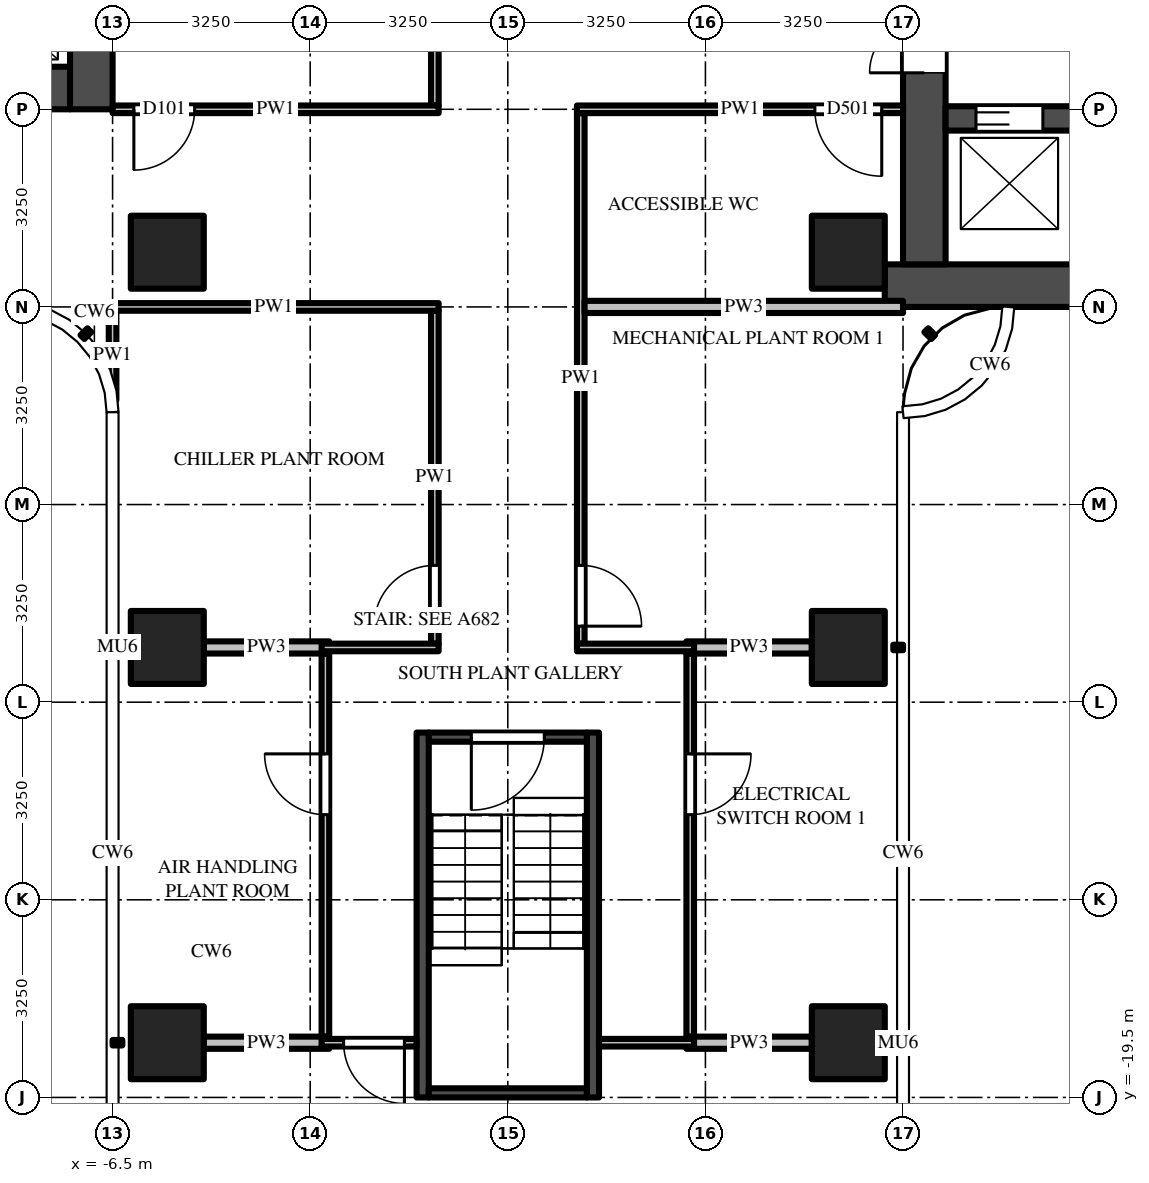
"""IFC4 building model, lengths in metres.
Left out: names, types, materials, properties, quantities, classifications, styles, units other than length and angle.
Written with IfcOpenShell. Run it as: python <this file> out.ifc"""

import sys

from ifc_helpers import new_model, si_unit, direction, frame, frame_2d, origin, origin_2d, place, context, subcontext, project, spatial, rectangle, extrude, source, transform, mapped, element, fill, save


model = new_model("IFC4")
c1 = context("Model", 3, precision=1e-05, world=origin(), true_north=direction((0.0, 1.0)))
c2 = subcontext(c1, "Body", "Model", "MODEL_VIEW")
j1 = project(units=[si_unit("LENGTHUNIT", "METRE"), si_unit("PLANEANGLEUNIT", "RADIAN")], contexts=[c1])
p1 = place(None, origin())
s1 = spatial("IfcSite", under=j1, at=p1, CompositionType="ELEMENT")
p2 = place(p1, origin())
s2 = spatial("IfcBuilding", under=s1, at=p2, CompositionType="ELEMENT")
p3 = place(p2, frame((0.0, 0.0, 156.0)))
s3 = spatial("IfcBuildingStorey", under=s2, at=p3, CompositionType="ELEMENT", Elevation=156.0)
m1 = source(origin(), c2, "Body", "SweptSolid", [
    extrude(rectangle(XDim=1.2, YDim=1.2, at=origin_2d()), origin(), (0.0, 0.0, 1.0), 6.0),
])
for number, where, z_axis, x_axis in (
    (1, (5.6, -5.6, 0.0), (0.0, 0.0, 1.0), (1.0, 0.0, 0.0)),
    (2, (-5.6, -5.6, 0.0), (0.0, 0.0, 1.0), (1.0, 0.0, 0.0)),
    (3, (5.6, -12.1, 0.0), (0.0, 0.0, 1.0), (1.0, 0.0, 0.0)),
    (4, (5.6, -18.6, 0.0), (0.0, 0.0, 1.0), (1.0, 0.0, 0.0)),
    (5, (-5.6, -12.1, 0.0), (0.0, 0.0, 1.0), (1.0, 0.0, 0.0)),
    (6, (-5.6, -18.6, 0.0), (0.0, 0.0, 1.0), (1.0, 0.0, 0.0)),
):
    element("IfcColumn", number, at=place(p3, frame(where, z_axis=z_axis, x_axis=x_axis)), inside=s3, PredefinedType="COLUMN", context=c2, shape_type="MappedRepresentation", body=[
        mapped(m1, transform((0.0, 0.0, 0.0))),
    ])
m2 = source(origin(), c2, "Body", "SweptSolid", [
    extrude(rectangle(XDim=16.55, YDim=0.7, at=frame_2d((8.275, 0.0))), origin(), (0.0, 0.0, 1.0), 5.8),
])
p4 = place(p3, frame((6.2, -6.15, 0.0), z_axis=(0.0, 0.0, 1.0), x_axis=(1.0, 0.0, 0.0)))
e7 = element("IfcWall", 7, at=p4, inside=s3, PredefinedType="SHEAR", context=c2, shape_type="MappedRepresentation", body=[
    mapped(m2, transform((0.0, 0.0, 0.0))),
])
m3 = source(origin(), c2, "Body", "SweptSolid", [
    extrude(rectangle(XDim=9.05, YDim=0.7, at=frame_2d((4.525, 0.0))), origin(), (0.0, 0.0, 1.0), 5.8),
])
p5 = place(p3, frame((6.85, -5.8, 0.0), z_axis=(0.0, 0.0, 1.0), x_axis=(0.0, 1.0, 0.0)))
e8 = element("IfcWall", 8, at=p5, inside=s3, PredefinedType="SHEAR", context=c2, shape_type="MappedRepresentation", body=[
    mapped(m3, transform((0.0, 0.0, 0.0))),
])
m4 = source(origin(), c2, "Body", "SweptSolid", [
    extrude(rectangle(XDim=1.8, YDim=2.1, at=frame_2d((0.9, 1.05))), frame((0.0, 0.36, 0.0), z_axis=(0.0, -1.0, 0.0), x_axis=(1.0, 0.0, 0.0)), (0.0, 0.0, 1.0), 0.72),
])
p6 = place(p5, frame((3.15, 0.0, 0.0)))
e9 = element("IfcOpeningElement", 9, at=p6, cuts=e8, PredefinedType="OPENING", context=c2, shape_type="MappedRepresentation", body=[
    mapped(m4, transform((0.0, 0.0, 0.0))),
])
m5 = source(origin(), c2, "Body", "SweptSolid", [
    extrude(rectangle(XDim=7.5, YDim=0.4, at=frame_2d((3.75, 0.0))), origin(), (0.0, 0.0, 1.0), 5.8),
])
p7 = place(p3, frame((7.2, -3.4, 0.0), z_axis=(0.0, 0.0, 1.0), x_axis=(1.0, 0.0, 0.0)))
e10 = element("IfcWall", 10, at=p7, inside=s3, PredefinedType="SHEAR", context=c2, shape_type="MappedRepresentation", body=[
    mapped(m5, transform((0.0, 0.0, 0.0))),
])
m6 = source(origin(), c2, "Body", "SweptSolid", [
    extrude(rectangle(XDim=1.1, YDim=2.1, at=frame_2d((0.55, 1.05))), frame((0.0, 0.21, 0.0), z_axis=(0.0, -1.0, 0.0), x_axis=(1.0, 0.0, 0.0)), (0.0, 0.0, 1.0), 0.42),
])
p8 = place(p7, frame((0.5, 0.0, 0.0)))
e11 = element("IfcOpeningElement", 11, at=p8, cuts=e10, PredefinedType="OPENING", context=c2, shape_type="MappedRepresentation", body=[
    mapped(m6, transform((0.0, 0.0, 0.0))),
])
p9 = place(p7, frame((3.0, 0.0, 0.0)))
e12 = element("IfcOpeningElement", 12, at=p9, cuts=e10, PredefinedType="OPENING", context=c2, shape_type="MappedRepresentation", body=[
    mapped(m6, transform((0.0, 0.0, 0.0))),
])
p10 = place(p7, frame((5.5, 0.0, 0.0)))
e13 = element("IfcOpeningElement", 13, at=p10, cuts=e10, PredefinedType="OPENING", context=c2, shape_type="MappedRepresentation", body=[
    mapped(m6, transform((0.0, 0.0, 0.0))),
])
m7 = source(origin(), c2, "Body", "SweptSolid", [
    extrude(rectangle(XDim=14.85, YDim=0.7, at=frame_2d((7.425, 0.0))), origin(), (0.0, 0.0, 1.0), 5.8),
])
p11 = place(p3, frame((-7.2, -2.9, 0.0), z_axis=(0.0, 0.0, 1.0), x_axis=(-1.0, 0.0, 0.0)))
e14 = element("IfcWall", 14, at=p11, inside=s3, PredefinedType="SHEAR", context=c2, shape_type="MappedRepresentation", body=[
    mapped(m7, transform((0.0, 0.0, 0.0))),
])
m8 = source(origin(), c2, "Body", "SweptSolid", [
    extrude(rectangle(XDim=1.1, YDim=2.1, at=frame_2d((0.55, 1.05))), frame((0.0, 0.36, 0.0), z_axis=(0.0, -1.0, 0.0), x_axis=(1.0, 0.0, 0.0)), (0.0, 0.0, 1.0), 0.72),
])
p12 = place(p11, frame((0.55, 0.0, 0.0)))
e15 = element("IfcOpeningElement", 15, at=p12, cuts=e14, PredefinedType="OPENING", context=c2, shape_type="MappedRepresentation", body=[
    mapped(m8, transform((0.0, 0.0, 0.0))),
])
p13 = place(p11, frame((3.15, 0.0, 0.0)))
e16 = element("IfcOpeningElement", 16, at=p13, cuts=e14, PredefinedType="OPENING", context=c2, shape_type="MappedRepresentation", body=[
    mapped(m8, transform((0.0, 0.0, 0.0))),
])
m9 = source(origin(), c2, "Body", "SweptSolid", [
    extrude(rectangle(XDim=1.2, YDim=2.1, at=frame_2d((0.6, 1.05))), frame((0.0, 0.36, 0.0), z_axis=(0.0, -1.0, 0.0), x_axis=(1.0, 0.0, 0.0)), (0.0, 0.0, 1.0), 0.72),
])
p14 = place(p11, frame((5.7, 0.0, 0.0)))
e17 = element("IfcOpeningElement", 17, at=p14, cuts=e14, PredefinedType="OPENING", context=c2, shape_type="MappedRepresentation", body=[
    mapped(m9, transform((0.0, 0.0, 0.0))),
])
m10 = source(origin(), c2, "Body", "SweptSolid", [
    extrude(rectangle(XDim=1.3, YDim=2.1, at=frame_2d((0.65, 1.05))), frame((0.0, 0.36, 0.0), z_axis=(0.0, -1.0, 0.0), x_axis=(1.0, 0.0, 0.0)), (0.0, 0.0, 1.0), 0.72),
])
p15 = place(p11, frame((12.2, 0.0, 0.0)))
e18 = element("IfcOpeningElement", 18, at=p15, cuts=e14, PredefinedType="OPENING", context=c2, shape_type="MappedRepresentation", body=[
    mapped(m10, transform((0.0, 0.0, 0.0))),
])
p16 = place(p11, frame((9.85, 0.0, 0.0)))
e19 = element("IfcOpeningElement", 19, at=p16, cuts=e14, PredefinedType="OPENING", context=c2, shape_type="MappedRepresentation", body=[
    mapped(m9, transform((0.0, 0.0, 0.0))),
])
m11 = source(origin(), c2, "Body", "SweptSolid", [
    extrude(rectangle(XDim=1.0, YDim=2.1, at=frame_2d((0.5, 1.05))), frame((0.0, 0.36, 0.0), z_axis=(0.0, -1.0, 0.0), x_axis=(1.0, 0.0, 0.0)), (0.0, 0.0, 1.0), 0.72),
])
p17 = place(p11, frame((7.9, 0.0, 0.0)))
e20 = element("IfcOpeningElement", 20, at=p17, cuts=e14, PredefinedType="OPENING", context=c2, shape_type="MappedRepresentation", body=[
    mapped(m11, transform((0.0, 0.0, 0.0))),
])
p18 = place(p3, frame((-6.85, 5.8, 0.0), z_axis=(0.0, 0.0, 1.0), x_axis=(0.0, -1.0, 0.0)))
e21 = element("IfcWall", 21, at=p18, inside=s3, PredefinedType="SHEAR", context=c2, shape_type="MappedRepresentation", body=[
    mapped(m3, transform((0.0, 0.0, 0.0))),
])
p19 = place(p18, frame((3.15, 0.0, 0.0)))
e22 = element("IfcOpeningElement", 22, at=p19, cuts=e21, PredefinedType="OPENING", context=c2, shape_type="MappedRepresentation", body=[
    mapped(m4, transform((0.0, 0.0, 0.0))),
])
m12 = source(origin(), c2, "Body", "SweptSolid", [
    extrude(rectangle(XDim=6.0, YDim=0.2, at=frame_2d((3.0, 0.0))), origin(), (0.0, 0.0, 1.0), 5.8),
])
for number, where, z_axis, x_axis in (
    (23, (1.4, -13.5, 0.0), (0.0, 0.0, 1.0), (0.0, -1.0, 0.0)),
    (24, (-1.4, -13.5, 0.0), (0.0, 0.0, 1.0), (0.0, -1.0, 0.0)),
):
    element("IfcWall", number, at=place(p3, frame(where, z_axis=z_axis, x_axis=x_axis)), inside=s3, PredefinedType="SHEAR", context=c2, shape_type="MappedRepresentation", body=[
        mapped(m12, transform((0.0, 0.0, 0.0))),
    ])
m13 = source(origin(), c2, "Body", "SweptSolid", [
    extrude(rectangle(XDim=2.6, YDim=0.15, at=frame_2d((1.3, 0.0))), origin(), (0.0, 0.0, 1.0), 5.8),
])
p20 = place(p3, frame((1.3, -13.575, 0.0), z_axis=(0.0, 0.0, 1.0), x_axis=(-1.0, 0.0, 0.0)))
e25 = element("IfcWall", 25, at=p20, inside=s3, PredefinedType="SHEAR", context=c2, shape_type="MappedRepresentation", body=[
    mapped(m13, transform((0.0, 0.0, 0.0))),
])
m14 = source(origin(), c2, "Body", "SweptSolid", [
    extrude(rectangle(XDim=1.2, YDim=2.1, at=frame_2d((0.6, 1.05))), frame((0.0, 0.085, 0.0), z_axis=(0.0, -1.0, 0.0), x_axis=(1.0, 0.0, 0.0)), (0.0, 0.0, 1.0), 0.17),
])
p21 = place(p20, frame((0.7, 0.0, 0.0)))
e26 = element("IfcOpeningElement", 26, at=p21, cuts=e25, PredefinedType="OPENING", context=c2, shape_type="MappedRepresentation", body=[
    mapped(m14, transform((0.0, 0.0, 0.0))),
])
p22 = place(p3, frame((1.3, -19.425, 0.0), z_axis=(0.0, 0.0, 1.0), x_axis=(-1.0, 0.0, 0.0)))
e27 = element("IfcWall", 27, at=p22, inside=s3, PredefinedType="SHEAR", context=c2, shape_type="MappedRepresentation", body=[
    mapped(m13, transform((0.0, 0.0, 0.0))),
])
m15 = source(origin(), c2, "Body", "SweptSolid", [
    extrude(rectangle(XDim=1.469, YDim=0.125, at=frame_2d((0.734, 0.0))), origin(), (0.0, 0.0, 1.0), 5.8),
])
p23 = place(p3, frame((-6.5, -6.562, 0.0), z_axis=(0.0, 0.0, 1.0), x_axis=(0.0, -1.0, 0.0)))
e28 = element("IfcWall", 28, at=p23, inside=s3, PredefinedType="PARTITIONING", context=c2, shape_type="MappedRepresentation", body=[
    mapped(m15, transform((0.0, 0.0, 0.0))),
])
m16 = source(origin(), c2, "Body", "SweptSolid", [
    extrude(rectangle(XDim=6.3, YDim=0.125, at=frame_2d((3.15, 0.0))), origin(), (0.0, 0.0, 1.0), 5.097),
])
p24 = place(p3, frame((-3.0, -18.5, 0.0), z_axis=(0.0, 0.0, 1.0), x_axis=(0.0, 1.0, 0.0)))
e29 = element("IfcWall", 29, at=p24, inside=s3, PredefinedType="PARTITIONING", context=c2, shape_type="MappedRepresentation", body=[
    mapped(m16, transform((0.0, 0.0, 0.0))),
])
m17 = source(origin(), c2, "Body", "SweptSolid", [
    extrude(rectangle(XDim=1.0, YDim=2.1, at=frame_2d((0.5, 1.05))), frame((0.0, 0.073, 0.0), z_axis=(0.0, -1.0, 0.0), x_axis=(1.0, 0.0, 0.0)), (0.0, 0.0, 1.0), 0.145),
])
p25 = place(p24, frame((3.65, 0.0, 0.0)))
e30 = element("IfcOpeningElement", 30, at=p25, cuts=e29, PredefinedType="OPENING", context=c2, shape_type="MappedRepresentation", body=[
    mapped(m17, transform((0.0, 0.0, 0.0))),
])
m18 = source(origin(), c2, "Body", "SweptSolid", [
    extrude(rectangle(XDim=3.125, YDim=0.125, at=frame_2d((1.562, 0.0))), origin(), (0.0, 0.0, 1.0), 5.168),
])
p26 = place(p3, frame((-1.2, -0.062, 0.0), z_axis=(0.0, 0.0, 1.0), x_axis=(0.0, -1.0, 0.0)))
e31 = element("IfcWall", 31, at=p26, inside=s3, PredefinedType="PARTITIONING", context=c2, shape_type="MappedRepresentation", body=[
    mapped(m18, transform((0.0, 0.0, 0.0))),
])
p27 = place(p3, frame((-1.2, -12.038, 0.0), z_axis=(0.0, 0.0, 1.0), x_axis=(0.0, 1.0, 0.0)))
e32 = element("IfcWall", 32, at=p27, inside=s3, PredefinedType="PARTITIONING", context=c2, shape_type="SweptSolid", body=[
    extrude(rectangle(XDim=5.475, YDim=0.125, at=frame_2d((2.738, 0.0))), origin(), (0.0, 0.0, 1.0), 5.097),
])
p28 = place(p27, frame((0.288, 0.0, 0.0)))
e33 = element("IfcOpeningElement", 33, at=p28, cuts=e32, PredefinedType="OPENING", context=c2, shape_type="MappedRepresentation", body=[
    mapped(m17, transform((0.0, 0.0, 0.0))),
])
p29 = place(p3, frame((1.2, -3.312, 0.0), z_axis=(0.0, 0.0, 1.0), x_axis=(0.0, -1.0, 0.0)))
e34 = element("IfcWall", 34, at=p29, inside=s3, PredefinedType="PARTITIONING", context=c2, shape_type="SweptSolid", body=[
    extrude(rectangle(XDim=8.725, YDim=0.125, at=frame_2d((4.363, 0.0))), origin(), (0.0, 0.0, 1.0), 5.097),
])
p30 = place(p29, frame((7.438, 0.0, 0.0)))
e35 = element("IfcOpeningElement", 35, at=p30, cuts=e34, PredefinedType="OPENING", context=c2, shape_type="MappedRepresentation", body=[
    mapped(m17, transform((0.0, 0.0, 0.0))),
])
p31 = place(p3, frame((3.0, -12.2, 0.0), z_axis=(0.0, 0.0, 1.0), x_axis=(0.0, -1.0, 0.0)))
e36 = element("IfcWall", 36, at=p31, inside=s3, PredefinedType="PARTITIONING", context=c2, shape_type="MappedRepresentation", body=[
    mapped(m16, transform((0.0, 0.0, 0.0))),
])
p32 = place(p31, frame((1.65, 0.0, 0.0)))
e37 = element("IfcOpeningElement", 37, at=p32, cuts=e36, PredefinedType="OPENING", context=c2, shape_type="MappedRepresentation", body=[
    mapped(m17, transform((0.0, 0.0, 0.0))),
])
m19 = source(origin(), c2, "Body", "SweptSolid", [
    extrude(rectangle(XDim=2.062, YDim=0.2, at=frame_2d((1.031, 0.0))), origin(), (0.0, 0.0, 1.0), 5.323),
])
for number, where, z_axis, x_axis in (
    (38, (-5.0, -18.6, 0.0), (0.0, 0.0, 1.0), (1.0, 0.0, 0.0)),
    (39, (2.938, -18.6, 0.0), (0.0, 0.0, 1.0), (1.0, 0.0, 0.0)),
):
    element("IfcWall", number, at=place(p3, frame(where, z_axis=z_axis, x_axis=x_axis)), inside=s3, PredefinedType="PARTITIONING", context=c2, shape_type="MappedRepresentation", body=[
        mapped(m19, transform((0.0, 0.0, 0.0))),
    ])
m20 = source(origin(), c2, "Body", "SweptSolid", [
    extrude(rectangle(XDim=1.562, YDim=0.125, at=frame_2d((0.781, 0.0))), origin(), (0.0, 0.0, 1.0), 5.323),
])
p33 = place(p3, frame((-1.5, -18.6, 0.0), z_axis=(0.0, 0.0, 1.0), x_axis=(-1.0, 0.0, 0.0)))
e40 = element("IfcWall", 40, at=p33, inside=s3, PredefinedType="PARTITIONING", context=c2, shape_type="MappedRepresentation", body=[
    mapped(m20, transform((0.0, 0.0, 0.0))),
])
p34 = place(p33, frame((0.2, 0.0, 0.0)))
e41 = element("IfcOpeningElement", 41, at=p34, cuts=e40, PredefinedType="OPENING", context=c2, shape_type="MappedRepresentation", body=[
    mapped(m17, transform((0.0, 0.0, 0.0))),
])
p35 = place(p3, frame((3.062, -18.6, 0.0), z_axis=(0.0, 0.0, 1.0), x_axis=(-1.0, 0.0, 0.0)))
e42 = element("IfcWall", 42, at=p35, inside=s3, PredefinedType="PARTITIONING", context=c2, shape_type="MappedRepresentation", body=[
    mapped(m20, transform((0.0, 0.0, 0.0))),
])
m21 = source(origin(), c2, "Body", "SweptSolid", [
    extrude(rectangle(XDim=2.062, YDim=0.2, at=frame_2d((1.031, 0.0))), origin(), (0.0, 0.0, 1.0), 5.097),
])
for number, where, z_axis, x_axis in (
    (43, (-5.0, -12.1, 0.0), (0.0, 0.0, 1.0), (1.0, 0.0, 0.0)),
    (44, (2.938, -12.1, 0.0), (0.0, 0.0, 1.0), (1.0, 0.0, 0.0)),
):
    element("IfcWall", number, at=place(p3, frame(where, z_axis=z_axis, x_axis=x_axis)), inside=s3, PredefinedType="PARTITIONING", context=c2, shape_type="MappedRepresentation", body=[
        mapped(m21, transform((0.0, 0.0, 0.0))),
    ])
m22 = source(origin(), c2, "Body", "SweptSolid", [
    extrude(rectangle(XDim=1.925, YDim=0.125, at=frame_2d((0.962, 0.0))), origin(), (0.0, 0.0, 1.0), 5.097),
])
for number, where, z_axis, x_axis in (
    (45, (-3.062, -12.1, 0.0), (0.0, 0.0, 1.0), (1.0, 0.0, 0.0)),
    (46, (1.137, -12.1, 0.0), (0.0, 0.0, 1.0), (1.0, 0.0, 0.0)),
):
    element("IfcWall", number, at=place(p3, frame(where, z_axis=z_axis, x_axis=x_axis)), inside=s3, PredefinedType="PARTITIONING", context=c2, shape_type="MappedRepresentation", body=[
        mapped(m22, transform((0.0, 0.0, 0.0))),
    ])
p36 = place(p3, frame((1.262, -6.5, 0.0), z_axis=(0.0, 0.0, 1.0), x_axis=(1.0, 0.0, 0.0)))
e47 = element("IfcWall", 47, at=p36, inside=s3, PredefinedType="PARTITIONING", context=c2, shape_type="SweptSolid", body=[
    extrude(rectangle(XDim=5.238, YDim=0.2, at=frame_2d((2.619, 0.0))), origin(), (0.0, 0.0, 1.0), 4.88),
])
p37 = place(p3, frame((-1.137, -6.5, 0.0), z_axis=(0.0, 0.0, 1.0), x_axis=(-1.0, 0.0, 0.0)))
e48 = element("IfcWall", 48, at=p37, inside=s3, PredefinedType="PARTITIONING", context=c2, shape_type="SweptSolid", body=[
    extrude(rectangle(XDim=5.425, YDim=0.125, at=frame_2d((2.712, 0.0))), origin(), (0.0, 0.0, 1.0), 4.88),
])
m23 = source(origin(), c2, "Body", "SweptSolid", [
    extrude(rectangle(XDim=5.363, YDim=0.125, at=frame_2d((2.681, 0.0))), origin(), (0.0, 0.0, 1.0), 5.097),
])
p38 = place(p3, frame((-1.137, -3.25, 0.0), z_axis=(0.0, 0.0, 1.0), x_axis=(-1.0, 0.0, 0.0)))
e49 = element("IfcWall", 49, at=p38, inside=s3, PredefinedType="PARTITIONING", context=c2, shape_type="MappedRepresentation", body=[
    mapped(m23, transform((0.0, 0.0, 0.0))),
])
p39 = place(p38, frame((4.012, 0.0, 0.0)))
e50 = element("IfcOpeningElement", 50, at=p39, cuts=e49, PredefinedType="OPENING", context=c2, shape_type="MappedRepresentation", body=[
    mapped(m17, transform((0.0, 0.0, 0.0))),
])
p40 = place(p3, frame((6.5, -3.25, 0.0), z_axis=(0.0, 0.0, 1.0), x_axis=(-1.0, 0.0, 0.0)))
e51 = element("IfcWall", 51, at=p40, inside=s3, PredefinedType="PARTITIONING", context=c2, shape_type="MappedRepresentation", body=[
    mapped(m23, transform((0.0, 0.0, 0.0))),
])
m24 = source(origin(), c2, "Body", "SweptSolid", [
    extrude(rectangle(XDim=1.1, YDim=2.1, at=frame_2d((0.55, 1.05))), frame((0.0, 0.073, 0.0), z_axis=(0.0, -1.0, 0.0), x_axis=(1.0, 0.0, 0.0)), (0.0, 0.0, 1.0), 0.145),
])
p41 = place(p40, frame((0.35, 0.0, 0.0)))
e52 = element("IfcOpeningElement", 52, at=p41, cuts=e51, PredefinedType="OPENING", context=c2, shape_type="MappedRepresentation", body=[
    mapped(m24, transform((0.0, 0.0, 0.0))),
])
m25 = source(origin(), c2, "Body", "SweptSolid", [
    extrude(rectangle(XDim=1.1, YDim=2.1, at=frame_2d((0.55, 1.05))), frame((0.0, 0.025, 0.0), z_axis=(0.0, -1.0, 0.0), x_axis=(1.0, 0.0, 0.0)), (0.0, 0.0, 1.0), 0.05),
])
p42 = place(p8, origin())
e53 = element("IfcDoor", 53, at=p42, inside=s3, OperationType="DOUBLE_DOOR_SLIDING", PredefinedType="DOOR", context=c2, shape_type="MappedRepresentation", body=[
    mapped(m25, transform((0.0, 0.0, 0.0))),
])
fill(e11, e53)
m26 = source(origin(), c2, "Body", "SweptSolid", [
    extrude(rectangle(XDim=1.8, YDim=2.1, at=frame_2d((0.9, 1.05))), frame((0.0, -0.275, 0.0), z_axis=(0.0, -1.0, 0.0), x_axis=(1.0, 0.0, 0.0)), (0.0, 0.0, 1.0), 0.05),
])
p43 = place(p6, origin())
e54 = element("IfcDoor", 54, at=p43, inside=s3, OperationType="DOUBLE_DOOR_SINGLE_SWING", PredefinedType="DOOR", context=c2, shape_type="MappedRepresentation", body=[
    mapped(m26, transform((0.0, 0.0, 0.0))),
])
fill(e9, e54)
m27 = source(origin(), c2, "Body", "SweptSolid", [
    extrude(rectangle(XDim=1.2, YDim=2.1, at=frame_2d((0.6, 1.05))), frame((0.0, 0.025, 0.0), z_axis=(0.0, -1.0, 0.0), x_axis=(1.0, 0.0, 0.0)), (0.0, 0.0, 1.0), 0.05),
])
p44 = place(p21, origin())
e55 = element("IfcDoor", 55, at=p44, inside=s3, OperationType="SINGLE_SWING_RIGHT", PredefinedType="DOOR", context=c2, shape_type="MappedRepresentation", body=[
    mapped(m27, transform((0.0, 0.0, 0.0))),
])
fill(e26, e55)
m28 = source(origin(), c2, "Body", "SweptSolid", [
    extrude(rectangle(XDim=1.0, YDim=2.1, at=frame_2d((0.5, 1.05))), frame((0.0, 0.025, 0.0), z_axis=(0.0, -1.0, 0.0), x_axis=(1.0, 0.0, 0.0)), (0.0, 0.0, 1.0), 0.05),
])
p45 = place(p34, origin())
e56 = element("IfcDoor", 56, at=p45, inside=s3, OperationType="SINGLE_SWING_LEFT", PredefinedType="DOOR", context=c2, shape_type="MappedRepresentation", body=[
    mapped(m28, transform((0.0, 0.0, 0.0))),
])
fill(e41, e56)
p46 = place(p25, origin())
e57 = element("IfcDoor", 57, at=p46, inside=s3, OperationType="SINGLE_SWING_RIGHT", PredefinedType="DOOR", context=c2, shape_type="MappedRepresentation", body=[
    mapped(m28, transform((0.0, 0.0, 0.0))),
])
fill(e30, e57)
p47 = place(p32, origin())
e58 = element("IfcDoor", 58, at=p47, inside=s3, OperationType="SINGLE_SWING_LEFT", PredefinedType="DOOR", context=c2, shape_type="MappedRepresentation", body=[
    mapped(m28, transform((0.0, 0.0, 0.0))),
])
fill(e37, e58)
p48 = place(p28, origin())
e59 = element("IfcDoor", 59, at=p48, inside=s3, OperationType="SINGLE_SWING_LEFT", PredefinedType="DOOR", context=c2, shape_type="MappedRepresentation", body=[
    mapped(m28, transform((0.0, 0.0, 0.0))),
])
fill(e33, e59)
p49 = place(p30, origin())
e60 = element("IfcDoor", 60, at=p49, inside=s3, OperationType="SINGLE_SWING_RIGHT", PredefinedType="DOOR", context=c2, shape_type="MappedRepresentation", body=[
    mapped(m28, transform((0.0, 0.0, 0.0))),
])
fill(e35, e60)
p50 = place(p39, origin())
e61 = element("IfcDoor", 61, at=p50, inside=s3, OperationType="SINGLE_SWING_RIGHT", PredefinedType="DOOR", context=c2, shape_type="MappedRepresentation", body=[
    mapped(m28, transform((0.0, 0.0, 0.0))),
])
fill(e50, e61)
p51 = place(p41, origin())
e62 = element("IfcDoor", 62, at=p51, inside=s3, OperationType="SINGLE_SWING_LEFT", PredefinedType="DOOR", context=c2, shape_type="MappedRepresentation", body=[
    mapped(m25, transform((0.0, 0.0, 0.0))),
])
fill(e52, e62)
save(model, sys.argv[1])
